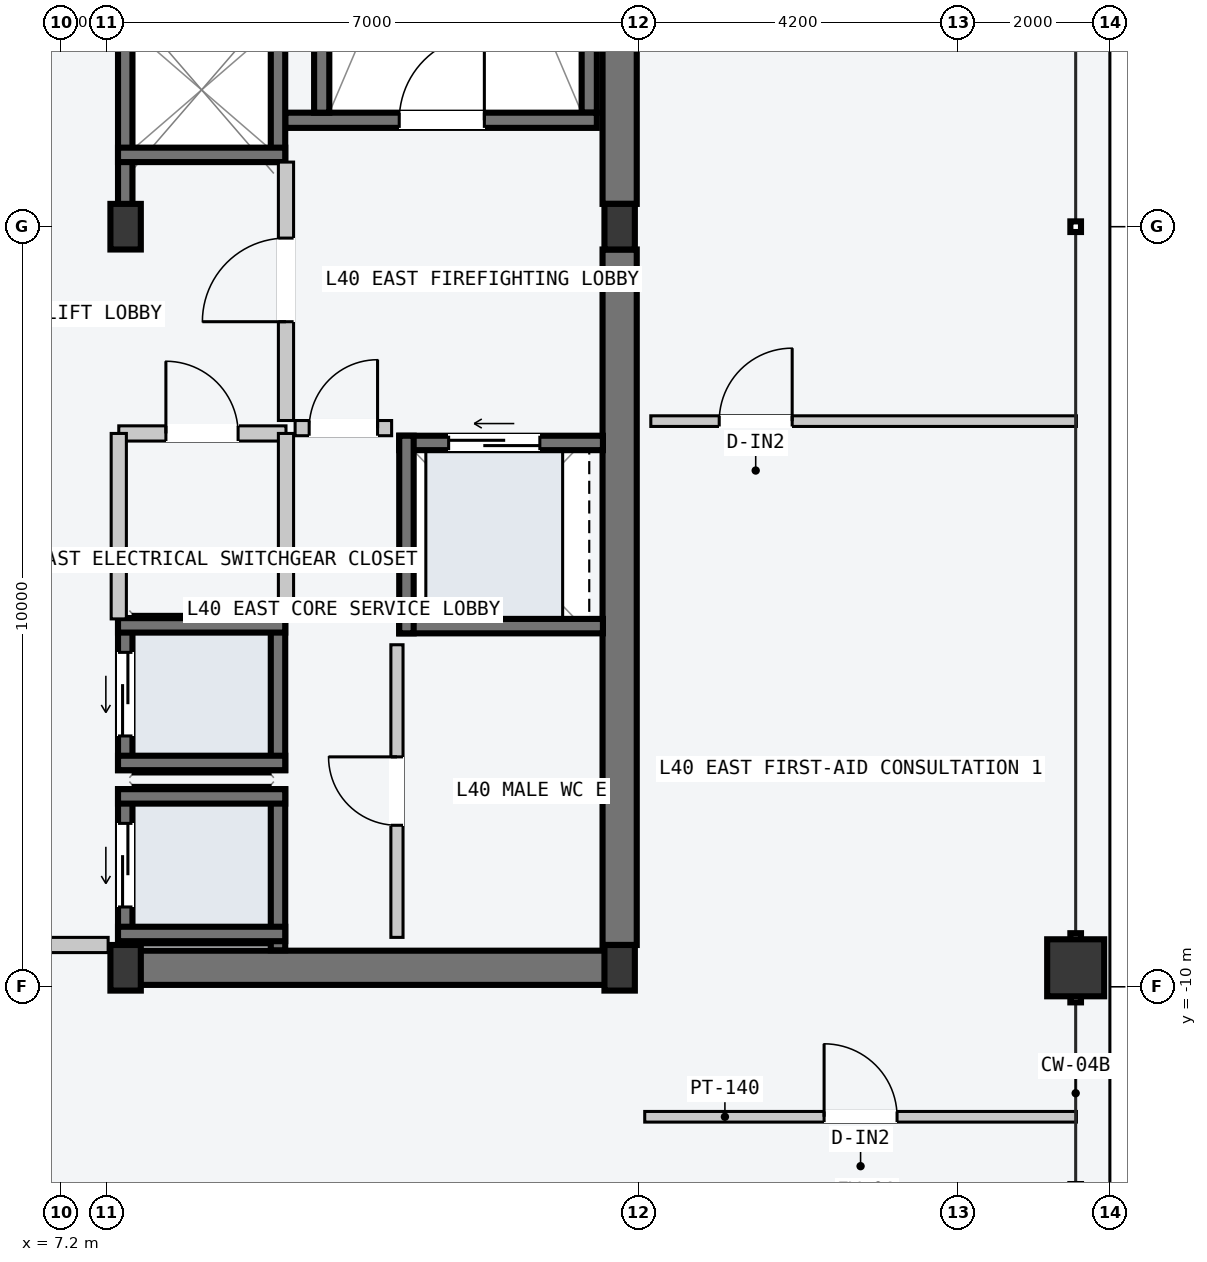
"""IFC4 building model, lengths in metres.
Left out: names, types, materials, properties, quantities, classifications, styles, units other than length and angle.
Written with IfcOpenShell. Run it as: python <this file> out.ifc"""

import sys

from ifc_helpers import new_model, si_unit, direction, frame, frame_2d, origin, origin_2d, place, context, subcontext, project, spatial, rectangle, hollow_rectangle, i_section, extrude, element, fill, save


model = new_model("IFC4")
c1 = context("Model", 3, precision=1e-05, world=origin(), true_north=direction((0.0, 1.0)))
c2 = subcontext(c1, "Body", "Model", "MODEL_VIEW")
j1 = project(units=[si_unit("LENGTHUNIT", "METRE"), si_unit("PLANEANGLEUNIT", "RADIAN")], contexts=[c1])
p1 = place(None, origin())
s1 = spatial("IfcSite", under=j1, at=p1, CompositionType="ELEMENT")
p2 = place(p1, origin())
s2 = spatial("IfcBuilding", under=s1, at=p2, CompositionType="ELEMENT")
p3 = place(p2, frame((0.0, 0.0, 155.1)))
s3 = spatial("IfcBuildingStorey", under=s2, at=p3, CompositionType="ELEMENT", Elevation=155.1)
p4 = place(p3, frame((8.07, -9.75, -0.2), z_axis=(0.0, 0.0, 1.0), x_axis=(1.0, 0.0, 0.0)))
e1 = element("IfcWall", 1, at=p4, inside=s3, PredefinedType="SHEAR", context=c2, shape_type="SweptSolid", body=[
    extrude(rectangle(XDim=6.46, YDim=0.45, at=frame_2d((3.23, 0.0))), origin(), (0.0, 0.0, 1.0), 3.6),
])
for number, where, z_axis, x_axis in (
    (2, (14.55, -9.45, -0.2), (0.0, 0.0, 1.0), (0.0, 1.0, 0.0)),
    (3, (14.55, 0.3, -0.2), (0.0, 0.0, 1.0), (0.0, 1.0, 0.0)),
):
    element("IfcWall", number, at=place(p3, frame(where, z_axis=z_axis, x_axis=x_axis)), inside=s3, PredefinedType="SHEAR", context=c2, shape_type="SweptSolid", body=[
        extrude(rectangle(XDim=9.15, YDim=0.45, at=frame_2d((4.575, 0.0))), origin(), (0.0, 0.0, 1.0), 3.6),
    ])
p5 = place(p3, frame((14.15, 1.5, -0.2), z_axis=(0.0, 0.0, 1.0), x_axis=(0.0, 1.0, 0.0)))
e4 = element("IfcWall", 4, at=p5, inside=s3, PredefinedType="SOLIDWALL", context=c2, shape_type="SweptSolid", body=[
    extrude(rectangle(XDim=7.8, YDim=0.2, at=frame_2d((3.9, 0.0))), origin(), (0.0, 0.0, 1.0), 3.6),
])
p6 = place(p3, frame((10.15, 1.4, -0.2), z_axis=(0.0, 0.0, 1.0), x_axis=(1.0, 0.0, 0.0)))
e5 = element("IfcWall", 5, at=p6, inside=s3, PredefinedType="SOLIDWALL", context=c2, shape_type="SweptSolid", body=[
    extrude(rectangle(XDim=4.1, YDim=0.2, at=frame_2d((2.05, 0.0))), origin(), (0.0, 0.0, 1.0), 3.6),
])
p7 = place(p6, frame((1.5, 0.0, 0.2)))
e6 = element("IfcOpeningElement", 6, at=p7, cuts=e5, PredefinedType="OPENING", context=c2, shape_type="SweptSolid", body=[
    extrude(rectangle(XDim=1.12, YDim=2.18, at=frame_2d((0.56, 1.09))), frame((0.0, 0.11, 0.0), z_axis=(0.0, -1.0, 0.0), x_axis=(1.0, 0.0, 0.0)), (0.0, 0.0, 1.0), 0.22),
])
p8 = place(p3, frame((10.63, 1.5, -0.2), z_axis=(0.0, 0.0, 1.0), x_axis=(0.0, 1.0, 0.0)))
e7 = element("IfcWall", 7, at=p8, inside=s3, PredefinedType="SOLIDWALL", context=c2, shape_type="SweptSolid", body=[
    extrude(rectangle(XDim=7.8, YDim=0.2, at=frame_2d((3.9, 0.0))), origin(), (0.0, 0.0, 1.0), 3.6),
])
for number, where, z_axis, x_axis in (
    (8, (8.05, -9.75, 0.0), (0.0, 0.0, 1.0), (1.0, 0.0, 0.0)),
    (9, (8.05, 0.0, 0.0), (0.0, 0.0, 1.0), (1.0, 0.0, 0.0)),
    (10, (14.55, -9.75, 0.0), (0.0, 0.0, 1.0), (1.0, 0.0, 0.0)),
    (11, (14.55, 0.0, 0.0), (0.0, 0.0, 1.0), (1.0, 0.0, 0.0)),
):
    element("IfcColumn", number, at=place(p3, frame(where, z_axis=z_axis, x_axis=x_axis)), inside=s3, PredefinedType="COLUMN", context=c2, shape_type="SweptSolid", body=[
        extrude(i_section(OverallWidth=0.4, OverallDepth=0.6, WebThickness=0.022, FlangeThickness=0.036, at=origin_2d()), origin(), (0.0, 0.0, 1.0), 3.6),
    ])
p9 = place(p3, frame((20.55, -9.75, 0.0), z_axis=(0.0, 0.0, 1.0), x_axis=(0.0, 1.0, 0.0)))
e12 = element("IfcColumn", 12, at=p9, inside=s3, PredefinedType="COLUMN", context=c2, shape_type="SweptSolid", body=[
    extrude(hollow_rectangle(XDim=0.75, YDim=0.75, WallThickness=0.032, at=origin_2d()), origin(), (0.0, 0.0, 1.0), 3.6),
])
p10 = place(p3, frame((8.045, 0.21, -0.2), z_axis=(0.0, 0.0, 1.0), x_axis=(0.0, 1.0, 0.0)))
e13 = element("IfcWall", 13, at=p10, inside=s3, PredefinedType="SOLIDWALL", context=c2, shape_type="SweptSolid", body=[
    extrude(rectangle(XDim=2.54, YDim=0.19, at=frame_2d((1.27, 0.0))), origin(), (0.0, 0.0, 1.0), 3.6),
])
p11 = place(p3, frame((10.055, 0.85, -0.2), z_axis=(0.0, 0.0, 1.0), x_axis=(0.0, 1.0, 0.0)))
e14 = element("IfcWall", 14, at=p11, inside=s3, PredefinedType="SOLIDWALL", context=c2, shape_type="SweptSolid", body=[
    extrude(rectangle(XDim=1.9, YDim=0.19, at=frame_2d((0.95, 0.0))), origin(), (0.0, 0.0, 1.0), 3.6),
])
p12 = place(p3, frame((7.95, 0.945, -0.2), z_axis=(0.0, 0.0, 1.0), x_axis=(1.0, 0.0, 0.0)))
e15 = element("IfcWall", 15, at=p12, inside=s3, PredefinedType="SOLIDWALL", context=c2, shape_type="SweptSolid", body=[
    extrude(rectangle(XDim=2.2, YDim=0.19, at=frame_2d((1.1, 0.0))), origin(), (0.0, 0.0, 1.0), 3.6),
])
p13 = place(p3, frame((8.045, -9.52, -0.2), z_axis=(0.0, 0.0, 1.0), x_axis=(0.0, 1.0, 0.0)))
e16 = element("IfcWall", 16, at=p13, inside=s3, PredefinedType="SOLIDWALL", context=c2, shape_type="SweptSolid", body=[
    extrude(rectangle(XDim=2.12, YDim=0.19, at=frame_2d((1.06, 0.0))), origin(), (0.0, 0.0, 1.0), 3.6),
])
p14 = place(p13, frame((0.57, 0.0, 0.2)))
e17 = element("IfcOpeningElement", 17, at=p14, cuts=e16, PredefinedType="OPENING", context=c2, shape_type="SweptSolid", body=[
    extrude(rectangle(XDim=1.1, YDim=2.2, at=frame_2d((0.55, 1.1))), frame((0.0, 0.105, 0.0), z_axis=(0.0, -1.0, 0.0), x_axis=(1.0, 0.0, 0.0)), (0.0, 0.0, 1.0), 0.21),
])
p15 = place(p3, frame((10.055, -9.52, -0.2), z_axis=(0.0, 0.0, 1.0), x_axis=(0.0, 1.0, 0.0)))
e18 = element("IfcWall", 18, at=p15, inside=s3, PredefinedType="SOLIDWALL", context=c2, shape_type="SweptSolid", body=[
    extrude(rectangle(XDim=2.12, YDim=0.19, at=frame_2d((1.06, 0.0))), origin(), (0.0, 0.0, 1.0), 3.6),
])
for number, where, z_axis, x_axis in (
    (19, (7.95, -7.495, -0.2), (0.0, 0.0, 1.0), (1.0, 0.0, 0.0)),
    (20, (7.95, -9.305, -0.2), (0.0, 0.0, 1.0), (1.0, 0.0, 0.0)),
):
    element("IfcWall", number, at=place(p3, frame(where, z_axis=z_axis, x_axis=x_axis)), inside=s3, PredefinedType="SOLIDWALL", context=c2, shape_type="SweptSolid", body=[
        extrude(rectangle(XDim=2.2, YDim=0.19, at=frame_2d((1.1, 0.0))), origin(), (0.0, 0.0, 1.0), 3.6),
    ])
p16 = place(p3, frame((8.045, -7.15, -0.2), z_axis=(0.0, 0.0, 1.0), x_axis=(0.0, 1.0, 0.0)))
e21 = element("IfcWall", 21, at=p16, inside=s3, PredefinedType="SOLIDWALL", context=c2, shape_type="SweptSolid", body=[
    extrude(rectangle(XDim=2.0, YDim=0.19, at=frame_2d((1.0, 0.0))), origin(), (0.0, 0.0, 1.0), 3.6),
])
p17 = place(p16, frame((0.45, 0.0, 0.2)))
e22 = element("IfcOpeningElement", 22, at=p17, cuts=e21, PredefinedType="OPENING", context=c2, shape_type="SweptSolid", body=[
    extrude(rectangle(XDim=1.1, YDim=2.2, at=frame_2d((0.55, 1.1))), frame((0.0, 0.105, 0.0), z_axis=(0.0, -1.0, 0.0), x_axis=(1.0, 0.0, 0.0)), (0.0, 0.0, 1.0), 0.21),
])
p18 = place(p3, frame((10.055, -7.15, -0.2), z_axis=(0.0, 0.0, 1.0), x_axis=(0.0, 1.0, 0.0)))
e23 = element("IfcWall", 23, at=p18, inside=s3, PredefinedType="SOLIDWALL", context=c2, shape_type="SweptSolid", body=[
    extrude(rectangle(XDim=2.0, YDim=0.19, at=frame_2d((1.0, 0.0))), origin(), (0.0, 0.0, 1.0), 3.6),
])
for number, where, z_axis, x_axis in (
    (24, (7.95, -5.245, -0.2), (0.0, 0.0, 1.0), (1.0, 0.0, 0.0)),
    (25, (7.95, -7.055, -0.2), (0.0, 0.0, 1.0), (1.0, 0.0, 0.0)),
):
    element("IfcWall", number, at=place(p3, frame(where, z_axis=z_axis, x_axis=x_axis)), inside=s3, PredefinedType="SOLIDWALL", context=c2, shape_type="SweptSolid", body=[
        extrude(rectangle(XDim=2.2, YDim=0.19, at=frame_2d((1.1, 0.0))), origin(), (0.0, 0.0, 1.0), 3.6),
    ])
p19 = place(p3, frame((11.65, -2.845, -0.2), z_axis=(0.0, 0.0, 1.0), x_axis=(1.0, 0.0, 0.0)))
e26 = element("IfcWall", 26, at=p19, inside=s3, PredefinedType="SOLIDWALL", context=c2, shape_type="SweptSolid", body=[
    extrude(rectangle(XDim=2.68, YDim=0.19, at=frame_2d((1.34, 0.0))), origin(), (0.0, 0.0, 1.0), 3.6),
])
p20 = place(p19, frame((0.65, 0.0, 0.2)))
e27 = element("IfcOpeningElement", 27, at=p20, cuts=e26, PredefinedType="OPENING", context=c2, shape_type="SweptSolid", body=[
    extrude(rectangle(XDim=1.2, YDim=2.2, at=frame_2d((0.6, 1.1))), frame((0.0, 0.105, 0.0), z_axis=(0.0, -1.0, 0.0), x_axis=(1.0, 0.0, 0.0)), (0.0, 0.0, 1.0), 0.21),
])
p21 = place(p3, frame((11.65, -5.255, -0.2), z_axis=(0.0, 0.0, 1.0), x_axis=(1.0, 0.0, 0.0)))
e28 = element("IfcWall", 28, at=p21, inside=s3, PredefinedType="SOLIDWALL", context=c2, shape_type="SweptSolid", body=[
    extrude(rectangle(XDim=2.68, YDim=0.19, at=frame_2d((1.34, 0.0))), origin(), (0.0, 0.0, 1.0), 3.6),
])
p22 = place(p3, frame((11.745, -5.35, -0.2), z_axis=(0.0, 0.0, 1.0), x_axis=(0.0, 1.0, 0.0)))
e29 = element("IfcWall", 29, at=p22, inside=s3, PredefinedType="SOLIDWALL", context=c2, shape_type="SweptSolid", body=[
    extrude(rectangle(XDim=2.6, YDim=0.19, at=frame_2d((1.3, 0.0))), origin(), (0.0, 0.0, 1.0), 3.6),
])
p23 = place(p3, frame((6.02, -9.45, 0.0), z_axis=(0.0, 0.0, 1.0), x_axis=(1.0, 0.0, 0.0)))
e30 = element("IfcWall", 30, at=p23, inside=s3, PredefinedType="PARTITIONING", context=c2, shape_type="SweptSolid", body=[
    extrude(rectangle(XDim=1.8, YDim=0.2, at=frame_2d((0.9, 0.0))), origin(), (0.0, 0.0, 1.0), 3.4),
])
p24 = place(p3, frame((10.16, -2.55, 0.0), z_axis=(0.0, 0.0, 1.0), x_axis=(0.0, 1.0, 0.0)))
e31 = element("IfcWall", 31, at=p24, inside=s3, PredefinedType="PARTITIONING", context=c2, shape_type="SweptSolid", body=[
    extrude(rectangle(XDim=3.4, YDim=0.2, at=frame_2d((1.7, 0.0))), origin(), (0.0, 0.0, 1.0), 3.4),
])
p25 = place(p24, frame((1.3, 0.0, 0.0)))
e32 = element("IfcOpeningElement", 32, at=p25, cuts=e31, PredefinedType="OPENING", context=c2, shape_type="SweptSolid", body=[
    extrude(rectangle(XDim=1.1, YDim=2.15, at=frame_2d((0.55, 1.075))), frame((0.0, 0.11, 0.0), z_axis=(0.0, -1.0, 0.0), x_axis=(1.0, 0.0, 0.0)), (0.0, 0.0, 1.0), 0.22),
])
p26 = place(p3, frame((10.28, -2.65, 0.0), z_axis=(0.0, 0.0, 1.0), x_axis=(1.0, 0.0, 0.0)))
e33 = element("IfcWall", 33, at=p26, inside=s3, PredefinedType="PARTITIONING", context=c2, shape_type="SweptSolid", body=[
    extrude(rectangle(XDim=1.27, YDim=0.2, at=frame_2d((0.635, 0.0))), origin(), (0.0, 0.0, 1.0), 3.4),
])
p27 = place(p26, frame((0.185, 0.0, 0.0)))
e34 = element("IfcOpeningElement", 34, at=p27, cuts=e33, PredefinedType="OPENING", context=c2, shape_type="SweptSolid", body=[
    extrude(rectangle(XDim=0.9, YDim=2.15, at=frame_2d((0.45, 1.075))), frame((0.0, 0.11, 0.0), z_axis=(0.0, -1.0, 0.0), x_axis=(1.0, 0.0, 0.0)), (0.0, 0.0, 1.0), 0.22),
])
p28 = place(p3, frame((7.96, -2.72, 0.0), z_axis=(0.0, 0.0, 1.0), x_axis=(1.0, 0.0, 0.0)))
e35 = element("IfcWall", 35, at=p28, inside=s3, PredefinedType="PARTITIONING", context=c2, shape_type="SweptSolid", body=[
    extrude(rectangle(XDim=2.2, YDim=0.2, at=frame_2d((1.1, 0.0))), origin(), (0.0, 0.0, 1.0), 3.4),
])
p29 = place(p28, frame((0.62, 0.0, 0.0)))
e36 = element("IfcOpeningElement", 36, at=p29, cuts=e35, PredefinedType="OPENING", context=c2, shape_type="SweptSolid", body=[
    extrude(rectangle(XDim=0.95, YDim=2.1, at=frame_2d((0.475, 1.05))), frame((0.0, 0.11, 0.0), z_axis=(0.0, -1.0, 0.0), x_axis=(1.0, 0.0, 0.0)), (0.0, 0.0, 1.0), 0.22),
])
for number, where, z_axis, x_axis in (
    (37, (7.96, -5.16, 0.0), (0.0, 0.0, 1.0), (0.0, 1.0, 0.0)),
    (38, (10.16, -5.16, 0.0), (0.0, 0.0, 1.0), (0.0, 1.0, 0.0)),
):
    element("IfcWall", number, at=place(p3, frame(where, z_axis=z_axis, x_axis=x_axis)), inside=s3, PredefinedType="PARTITIONING", context=c2, shape_type="SweptSolid", body=[
        extrude(rectangle(XDim=2.44, YDim=0.2, at=frame_2d((1.22, 0.0))), origin(), (0.0, 0.0, 1.0), 3.4),
    ])
p30 = place(p3, frame((11.62, -9.35, 0.0), z_axis=(0.0, 0.0, 1.0), x_axis=(0.0, 1.0, 0.0)))
e39 = element("IfcWall", 39, at=p30, inside=s3, PredefinedType="PARTITIONING", context=c2, shape_type="SweptSolid", body=[
    extrude(rectangle(XDim=3.85, YDim=0.16, at=frame_2d((1.925, 0.0))), origin(), (0.0, 0.0, 1.0), 3.4),
])
p31 = place(p30, frame((1.475, 0.0, 0.0)))
e40 = element("IfcOpeningElement", 40, at=p31, cuts=e39, PredefinedType="OPENING", context=c2, shape_type="SweptSolid", body=[
    extrude(rectangle(XDim=0.9, YDim=2.15, at=frame_2d((0.45, 1.075))), frame((0.0, 0.09, 0.0), z_axis=(0.0, -1.0, 0.0), x_axis=(1.0, 0.0, 0.0)), (0.0, 0.0, 1.0), 0.18),
])
p32 = place(p3, frame((14.88, -11.71, 0.0), z_axis=(0.0, 0.0, 1.0), x_axis=(1.0, 0.0, 0.0)))
e41 = element("IfcWall", 41, at=p32, inside=s3, PredefinedType="PARTITIONING", context=c2, shape_type="SweptSolid", body=[
    extrude(rectangle(XDim=5.68, YDim=0.14, at=frame_2d((2.84, 0.0))), origin(), (0.0, 0.0, 1.0), 3.4),
])
p33 = place(p32, frame((2.36, 0.0, 0.0)))
e42 = element("IfcOpeningElement", 42, at=p33, cuts=e41, PredefinedType="OPENING", context=c2, shape_type="SweptSolid", body=[
    extrude(rectangle(XDim=0.96, YDim=2.18, at=frame_2d((0.48, 1.09))), frame((0.0, 0.08, 0.0), z_axis=(0.0, -1.0, 0.0), x_axis=(1.0, 0.0, 0.0)), (0.0, 0.0, 1.0), 0.16),
])
p34 = place(p3, frame((14.96, -2.558, 0.0), z_axis=(0.0, 0.0, 1.0), x_axis=(1.0, 0.0, 0.0)))
e43 = element("IfcWall", 43, at=p34, inside=s3, PredefinedType="PARTITIONING", context=c2, shape_type="SweptSolid", body=[
    extrude(rectangle(XDim=5.6, YDim=0.14, at=frame_2d((2.8, 0.0))), origin(), (0.0, 0.0, 1.0), 3.4),
])
p35 = place(p34, frame((0.9, 0.0, 0.0)))
e44 = element("IfcOpeningElement", 44, at=p35, cuts=e43, PredefinedType="OPENING", context=c2, shape_type="SweptSolid", body=[
    extrude(rectangle(XDim=0.96, YDim=2.18, at=frame_2d((0.48, 1.09))), frame((0.0, 0.08, 0.0), z_axis=(0.0, -1.0, 0.0), x_axis=(1.0, 0.0, 0.0)), (0.0, 0.0, 1.0), 0.16),
])
p36 = place(p7, origin())
e45 = element("IfcDoor", 45, at=p36, inside=s3, OperationType="SINGLE_SWING_RIGHT", PredefinedType="DOOR", context=c2, shape_type="SweptSolid", body=[
    extrude(rectangle(XDim=1.12, YDim=2.18, at=frame_2d((0.56, 1.09))), frame((0.0, 0.025, 0.0), z_axis=(0.0, -1.0, 0.0), x_axis=(1.0, 0.0, 0.0)), (0.0, 0.0, 1.0), 0.05),
])
fill(e6, e45)
p37 = place(p14, origin())
e46 = element("IfcDoor", 46, at=p37, inside=s3, OperationType="SLIDING_TO_LEFT", PredefinedType="DOOR", context=c2, shape_type="SweptSolid", body=[
    extrude(rectangle(XDim=1.1, YDim=2.2, at=frame_2d((0.55, 1.1))), frame((0.0, 0.025, 0.0), z_axis=(0.0, -1.0, 0.0), x_axis=(1.0, 0.0, 0.0)), (0.0, 0.0, 1.0), 0.05),
])
fill(e17, e46)
p38 = place(p17, origin())
e47 = element("IfcDoor", 47, at=p38, inside=s3, OperationType="SLIDING_TO_LEFT", PredefinedType="DOOR", context=c2, shape_type="SweptSolid", body=[
    extrude(rectangle(XDim=1.1, YDim=2.2, at=frame_2d((0.55, 1.1))), frame((0.0, 0.025, 0.0), z_axis=(0.0, -1.0, 0.0), x_axis=(1.0, 0.0, 0.0)), (0.0, 0.0, 1.0), 0.05),
])
fill(e22, e47)
p39 = place(p20, origin())
e48 = element("IfcDoor", 48, at=p39, inside=s3, OperationType="SLIDING_TO_LEFT", PredefinedType="DOOR", context=c2, shape_type="SweptSolid", body=[
    extrude(rectangle(XDim=1.2, YDim=2.2, at=frame_2d((0.6, 1.1))), frame((0.0, 0.025, 0.0), z_axis=(0.0, -1.0, 0.0), x_axis=(1.0, 0.0, 0.0)), (0.0, 0.0, 1.0), 0.05),
])
fill(e27, e48)
p40 = place(p25, origin())
e49 = element("IfcDoor", 49, at=p40, inside=s3, OperationType="SINGLE_SWING_LEFT", PredefinedType="DOOR", context=c2, shape_type="SweptSolid", body=[
    extrude(rectangle(XDim=1.1, YDim=2.15, at=frame_2d((0.55, 1.075))), frame((0.0, 0.025, 0.0), z_axis=(0.0, -1.0, 0.0), x_axis=(1.0, 0.0, 0.0)), (0.0, 0.0, 1.0), 0.05),
])
fill(e32, e49)
p41 = place(p27, origin())
e50 = element("IfcDoor", 50, at=p41, inside=s3, OperationType="SINGLE_SWING_RIGHT", PredefinedType="DOOR", context=c2, shape_type="SweptSolid", body=[
    extrude(rectangle(XDim=0.9, YDim=2.15, at=frame_2d((0.45, 1.075))), frame((0.0, 0.025, 0.0), z_axis=(0.0, -1.0, 0.0), x_axis=(1.0, 0.0, 0.0)), (0.0, 0.0, 1.0), 0.05),
])
fill(e34, e50)
p42 = place(p29, origin())
e51 = element("IfcDoor", 51, at=p42, inside=s3, OperationType="SINGLE_SWING_LEFT", PredefinedType="DOOR", context=c2, shape_type="SweptSolid", body=[
    extrude(rectangle(XDim=0.95, YDim=2.1, at=frame_2d((0.475, 1.05))), frame((0.0, 0.025, 0.0), z_axis=(0.0, -1.0, 0.0), x_axis=(1.0, 0.0, 0.0)), (0.0, 0.0, 1.0), 0.05),
])
fill(e36, e51)
p43 = place(p31, origin())
e52 = element("IfcDoor", 52, at=p43, inside=s3, OperationType="SINGLE_SWING_RIGHT", PredefinedType="DOOR", context=c2, shape_type="SweptSolid", body=[
    extrude(rectangle(XDim=0.9, YDim=2.15, at=frame_2d((0.45, 1.075))), frame((0.0, 0.025, 0.0), z_axis=(0.0, -1.0, 0.0), x_axis=(1.0, 0.0, 0.0)), (0.0, 0.0, 1.0), 0.05),
])
fill(e40, e52)
p44 = place(p33, origin())
e53 = element("IfcDoor", 53, at=p44, inside=s3, OperationType="SINGLE_SWING_LEFT", PredefinedType="DOOR", context=c2, shape_type="SweptSolid", body=[
    extrude(rectangle(XDim=0.96, YDim=2.18, at=frame_2d((0.48, 1.09))), frame((0.0, 0.025, 0.0), z_axis=(0.0, -1.0, 0.0), x_axis=(1.0, 0.0, 0.0)), (0.0, 0.0, 1.0), 0.05),
])
fill(e42, e53)
p45 = place(p35, origin())
e54 = element("IfcDoor", 54, at=p45, inside=s3, OperationType="SINGLE_SWING_RIGHT", PredefinedType="DOOR", context=c2, shape_type="SweptSolid", body=[
    extrude(rectangle(XDim=0.96, YDim=2.18, at=frame_2d((0.48, 1.09))), frame((0.0, 0.025, 0.0), z_axis=(0.0, -1.0, 0.0), x_axis=(1.0, 0.0, 0.0)), (0.0, 0.0, 1.0), 0.05),
])
fill(e44, e54)
save(model, sys.argv[1])
